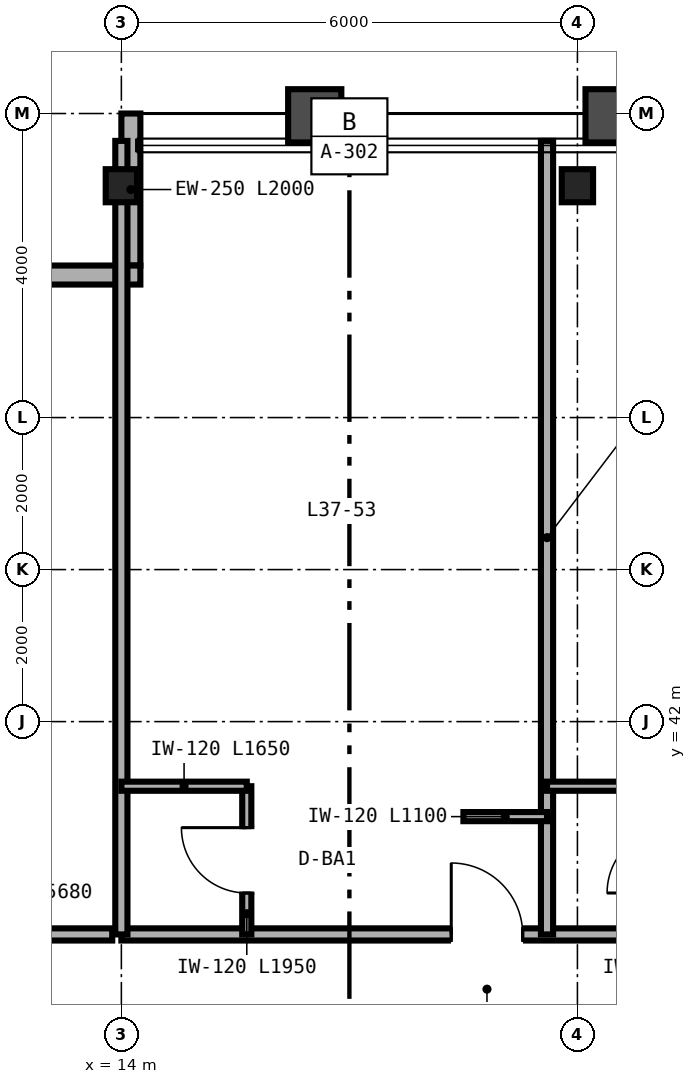
"""IFC4 building model, lengths in metres.
Left out: names, types, materials, properties, quantities, classifications, styles, units other than length and angle.
Written with IfcOpenShell. Run it as: python <this file> out.ifc"""

import sys

from ifc_helpers import new_model, si_unit, direction, frame, frame_2d, origin, origin_2d, place, context, subcontext, project, spatial, rectangle, i_section, extrude, source, transform, mapped, element, fill, save


model = new_model("IFC4")
c1 = context("Model", 3, precision=1e-05, world=origin(), true_north=direction((0.0, 1.0)))
c2 = subcontext(c1, "Body", "Model", "MODEL_VIEW")
j1 = project(units=[si_unit("LENGTHUNIT", "METRE"), si_unit("PLANEANGLEUNIT", "RADIAN")], contexts=[c1])
p1 = place(None, origin())
s1 = spatial("IfcSite", under=j1, at=p1, CompositionType="ELEMENT")
p2 = place(p1, origin())
s2 = spatial("IfcBuilding", under=s1, at=p2, CompositionType="ELEMENT")
p3 = place(p2, frame((0.0, 0.0, 147.6)))
s3 = spatial("IfcBuildingStorey", under=s2, at=p3, CompositionType="ELEMENT", Elevation=147.6)
m1 = source(origin(), c2, "Body", "SweptSolid", [
    extrude(i_section(OverallWidth=0.412, OverallDepth=0.435, WebThickness=0.036, FlangeThickness=0.057, FilletRadius=0.025, at=origin_2d()), origin(), (0.0, 0.0, 1.0), 3.28),
])
for number, where, z_axis, x_axis in (
    (1, (14.0, 49.05, 0.0), (0.0, 0.0, 1.0), (1.0, 0.0, 0.0)),
    (2, (20.0, 49.05, 0.0), (0.0, 0.0, 1.0), (1.0, 0.0, 0.0)),
):
    element("IfcColumn", number, at=place(p3, frame(where, z_axis=z_axis, x_axis=x_axis)), inside=s3, PredefinedType="COLUMN", context=c2, shape_type="MappedRepresentation", body=[
        mapped(m1, transform((0.0, 0.0, 0.0), scale=1.0)),
    ])
p4 = place(p3, frame((14.125, 50.0, 0.0), z_axis=(0.0, 0.0, 1.0), x_axis=(0.0, -1.0, 0.0)))
e3 = element("IfcWall", 3, at=p4, inside=s3, PredefinedType="SOLIDWALL", context=c2, shape_type="SweptSolid", body=[
    extrude(rectangle(XDim=2.0, YDim=0.25, at=frame_2d((1.0, 0.0))), origin(), (0.0, 0.0, 1.0), 2.587),
])
p5 = place(p3, frame((14.25, 47.875, 0.0), z_axis=(0.0, 0.0, 1.0), x_axis=(-1.0, 0.0, 0.0)))
e4 = element("IfcWall", 4, at=p5, inside=s3, PredefinedType="SOLIDWALL", context=c2, shape_type="SweptSolid", body=[
    extrude(rectangle(XDim=2.0, YDim=0.25, at=frame_2d((1.0, 0.0))), origin(), (0.0, 0.0, 1.0), 3.28),
])
p6 = place(p3, frame((8.2, 39.2, 0.0), z_axis=(0.0, 0.0, 1.0), x_axis=(1.0, 0.0, 0.0)))
e5 = element("IfcWall", 5, at=p6, inside=s3, PredefinedType="PARTITIONING", context=c2, shape_type="SweptSolid", body=[
    extrude(rectangle(XDim=5.68, YDim=0.16, at=frame_2d((2.84, 0.0))), origin(), (0.0, 0.0, 1.0), 3.28),
])
p7 = place(p6, frame((2.36, 0.0, 0.0)))
e6 = element("IfcOpeningElement", 6, at=p7, cuts=e5, PredefinedType="OPENING", context=c2, shape_type="SweptSolid", body=[
    extrude(rectangle(XDim=0.96, YDim=2.15, at=frame_2d((0.48, 1.075))), frame((0.0, 0.09, 0.0), z_axis=(0.0, -1.0, 0.0), x_axis=(1.0, 0.0, 0.0)), (0.0, 0.0, 1.0), 0.18),
])
p8 = place(p3, frame((14.0, 39.2, 0.0), z_axis=(0.0, 0.0, 1.0), x_axis=(1.0, 0.0, 0.0)))
e7 = element("IfcWall", 7, at=p8, inside=s3, PredefinedType="PARTITIONING", context=c2, shape_type="SweptSolid", body=[
    extrude(rectangle(XDim=36.0, YDim=0.16, at=frame_2d((18.0, 0.0))), origin(), (0.0, 0.0, 1.0), 2.501),
])
p9 = place(p8, frame((4.34, 0.0, 0.0)))
e8 = element("IfcOpeningElement", 8, at=p9, cuts=e7, PredefinedType="OPENING", context=c2, shape_type="SweptSolid", body=[
    extrude(rectangle(XDim=0.94, YDim=2.15, at=frame_2d((0.47, 1.075))), frame((0.0, 0.09, 0.0), z_axis=(0.0, -1.0, 0.0), x_axis=(1.0, 0.0, 0.0)), (0.0, 0.0, 1.0), 0.18),
])
p10 = place(p8, frame((9.94, 0.0, 0.0)))
e9 = element("IfcOpeningElement", 9, at=p10, cuts=e7, PredefinedType="OPENING", context=c2, shape_type="SweptSolid", body=[
    extrude(rectangle(XDim=0.94, YDim=2.15, at=frame_2d((0.47, 1.075))), frame((0.0, 0.09, 0.0), z_axis=(0.0, -1.0, 0.0), x_axis=(1.0, 0.0, 0.0)), (0.0, 0.0, 1.0), 0.18),
])
p11 = place(p8, frame((17.3, 0.0, 0.0)))
e10 = element("IfcOpeningElement", 10, at=p11, cuts=e7, PredefinedType="OPENING", context=c2, shape_type="SweptSolid", body=[
    extrude(rectangle(XDim=0.98, YDim=2.2, at=frame_2d((0.49, 1.1))), frame((0.0, 0.09, 0.0), z_axis=(0.0, -1.0, 0.0), x_axis=(1.0, 0.0, 0.0)), (0.0, 0.0, 1.0), 0.18),
])
p12 = place(p8, frame((24.7, 0.0, 0.0)))
e11 = element("IfcOpeningElement", 11, at=p12, cuts=e7, PredefinedType="OPENING", context=c2, shape_type="SweptSolid", body=[
    extrude(rectangle(XDim=0.98, YDim=2.2, at=frame_2d((0.49, 1.1))), frame((0.0, 0.09, 0.0), z_axis=(0.0, -1.0, 0.0), x_axis=(1.0, 0.0, 0.0)), (0.0, 0.0, 1.0), 0.18),
])
p13 = place(p8, frame((28.12, 0.0, 0.0)))
e12 = element("IfcOpeningElement", 12, at=p13, cuts=e7, PredefinedType="OPENING", context=c2, shape_type="SweptSolid", body=[
    extrude(rectangle(XDim=0.96, YDim=2.15, at=frame_2d((0.48, 1.075))), frame((0.0, 0.09, 0.0), z_axis=(0.0, -1.0, 0.0), x_axis=(1.0, 0.0, 0.0)), (0.0, 0.0, 1.0), 0.18),
])
p14 = place(p8, frame((34.74, 0.0, 0.0)))
e13 = element("IfcOpeningElement", 13, at=p14, cuts=e7, PredefinedType="OPENING", context=c2, shape_type="SweptSolid", body=[
    extrude(rectangle(XDim=0.94, YDim=2.15, at=frame_2d((0.47, 1.075))), frame((0.0, 0.09, 0.0), z_axis=(0.0, -1.0, 0.0), x_axis=(1.0, 0.0, 0.0)), (0.0, 0.0, 1.0), 0.18),
])
for number, where, z_axis, x_axis in (
    (14, (14.0, 39.2, 0.0), (0.0, 0.0, 1.0), (0.0, 1.0, 0.0)),
    (15, (19.6, 39.2, 0.0), (0.0, 0.0, 1.0), (0.0, 1.0, 0.0)),
):
    element("IfcWall", number, at=place(p3, frame(where, z_axis=z_axis, x_axis=x_axis)), inside=s3, PredefinedType="PARTITIONING", context=c2, shape_type="SweptSolid", body=[
        extrude(rectangle(XDim=10.44, YDim=0.16, at=frame_2d((5.22, 0.0))), origin(), (0.0, 0.0, 1.0), 2.587),
    ])
p15 = place(p3, frame((15.65, 39.2, 0.0), z_axis=(0.0, 0.0, 1.0), x_axis=(0.0, 1.0, 0.0)))
e16 = element("IfcWall", 16, at=p15, inside=s3, PredefinedType="PARTITIONING", context=c2, shape_type="SweptSolid", body=[
    extrude(rectangle(XDim=1.95, YDim=0.12, at=frame_2d((0.975, 0.0))), origin(), (0.0, 0.0, 1.0), 3.28),
])
p16 = place(p15, frame((0.545, 0.0, 0.0)))
e17 = element("IfcOpeningElement", 17, at=p16, cuts=e16, PredefinedType="OPENING", context=c2, shape_type="SweptSolid", body=[
    extrude(rectangle(XDim=0.86, YDim=2.1, at=frame_2d((0.43, 1.05))), frame((0.0, 0.07, 0.0), z_axis=(0.0, -1.0, 0.0), x_axis=(1.0, 0.0, 0.0)), (0.0, 0.0, 1.0), 0.14),
])
p17 = place(p3, frame((14.0, 41.15, 0.0), z_axis=(0.0, 0.0, 1.0), x_axis=(1.0, 0.0, 0.0)))
e18 = element("IfcWall", 18, at=p17, inside=s3, PredefinedType="PARTITIONING", context=c2, shape_type="SweptSolid", body=[
    extrude(rectangle(XDim=1.65, YDim=0.12, at=frame_2d((0.825, 0.0))), origin(), (0.0, 0.0, 1.0), 3.28),
])
p18 = place(p3, frame((18.5, 40.75, 0.0), z_axis=(0.0, 0.0, 1.0), x_axis=(1.0, 0.0, 0.0)))
e19 = element("IfcWall", 19, at=p18, inside=s3, PredefinedType="PARTITIONING", context=c2, shape_type="SweptSolid", body=[
    extrude(rectangle(XDim=1.1, YDim=0.12, at=frame_2d((0.55, 0.0))), origin(), (0.0, 0.0, 1.0), 3.28),
])
p19 = place(p3, frame((19.6, 41.15, 0.0), z_axis=(0.0, 0.0, 1.0), x_axis=(1.0, 0.0, 0.0)))
e20 = element("IfcWall", 20, at=p19, inside=s3, PredefinedType="PARTITIONING", context=c2, shape_type="SweptSolid", body=[
    extrude(rectangle(XDim=1.65, YDim=0.12, at=frame_2d((0.825, 0.0))), origin(), (0.0, 0.0, 1.0), 3.28),
])
m2 = source(origin(), c2, "Body", "SweptSolid", [
    extrude(rectangle(XDim=0.86, YDim=2.1, at=frame_2d((0.43, 1.05))), frame((0.0, 0.025, 0.0), z_axis=(0.0, -1.0, 0.0), x_axis=(1.0, 0.0, 0.0)), (0.0, 0.0, 1.0), 0.05),
])
p20 = place(p16, origin())
e21 = element("IfcDoor", 21, at=p20, inside=s3, OperationType="SINGLE_SWING_RIGHT", PredefinedType="DOOR", context=c2, shape_type="MappedRepresentation", body=[
    mapped(m2, transform((0.0, 0.0, 0.0), scale=1.0)),
])
fill(e17, e21)
m3 = source(origin(), c2, "Body", "SweptSolid", [
    extrude(rectangle(XDim=0.94, YDim=2.15, at=frame_2d((0.47, 1.075))), frame((0.0, 0.025, 0.0), z_axis=(0.0, -1.0, 0.0), x_axis=(1.0, 0.0, 0.0)), (0.0, 0.0, 1.0), 0.05),
])
p21 = place(p9, origin())
e22 = element("IfcDoor", 22, at=p21, inside=s3, OperationType="SINGLE_SWING_LEFT", PredefinedType="DOOR", context=c2, shape_type="MappedRepresentation", body=[
    mapped(m3, transform((0.0, 0.0, 0.0), scale=1.0)),
])
fill(e8, e22)
save(model, sys.argv[1])
